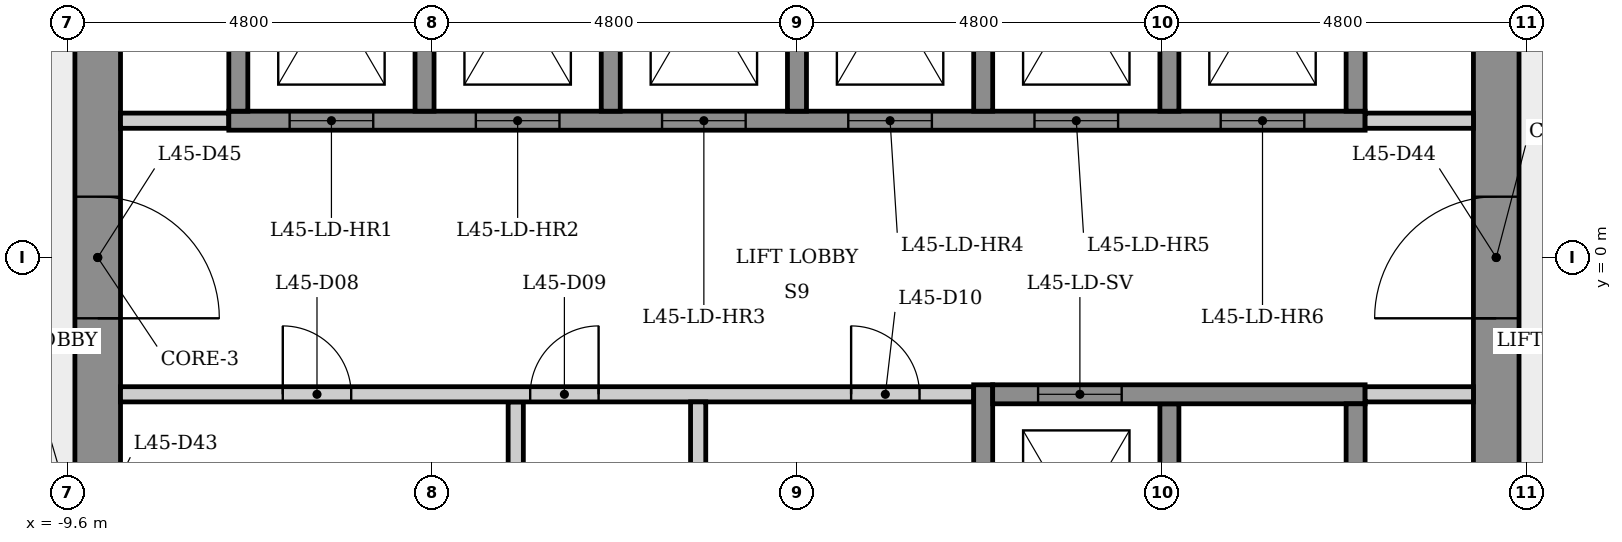
"""IFC4 building model, lengths in metres.
Left out: names, types, materials, properties, quantities, classifications, styles, units other than length and angle.
Written with IfcOpenShell. Run it as: python <this file> out.ifc"""

import sys

from ifc_helpers import new_model, si_unit, direction, frame, frame_2d, origin, place, context, subcontext, project, spatial, rectangle, extrude, element, fill, save


model = new_model("IFC4")
c1 = context("Model", 3, precision=1e-05, world=origin(), true_north=direction((0.0, 1.0)))
c2 = subcontext(c1, "Body", "Model", "MODEL_VIEW")
j1 = project(units=[si_unit("LENGTHUNIT", "METRE"), si_unit("PLANEANGLEUNIT", "RADIAN")], contexts=[c1])
p1 = place(None, origin())
s1 = spatial("IfcSite", under=j1, at=p1, CompositionType="ELEMENT")
p2 = place(p1, origin())
s2 = spatial("IfcBuilding", under=s1, at=p2, CompositionType="ELEMENT")
p3 = place(p2, frame((0.0, 0.0, 169.7)))
s3 = spatial("IfcBuildingStorey", under=s2, at=p3, CompositionType="ELEMENT", Elevation=169.7)
p4 = place(p3, frame((9.2, -5.485, 0.0), z_axis=(0.0, 0.0, 1.0), x_axis=(0.0, 1.0, 0.0)))
e1 = element("IfcWall", 1, at=p4, inside=s3, PredefinedType="SHEAR", context=c2, shape_type="SweptSolid", body=[
    extrude(rectangle(XDim=10.97, YDim=0.6, at=frame_2d((5.485, 0.0))), origin(), (0.0, 0.0, 1.0), 3.4),
])
p5 = place(p4, frame((4.685, 0.0, 0.0)))
e2 = element("IfcOpeningElement", 2, at=p5, cuts=e1, PredefinedType="OPENING", context=c2, shape_type="SweptSolid", body=[
    extrude(rectangle(XDim=1.6, YDim=2.1, at=frame_2d((0.8, 1.05))), frame((0.0, 0.31, 0.0), z_axis=(0.0, -1.0, 0.0), x_axis=(1.0, 0.0, 0.0)), (0.0, 0.0, 1.0), 0.62),
])
p6 = place(p3, frame((-9.2, 5.485, 0.0), z_axis=(0.0, 0.0, 1.0), x_axis=(0.0, -1.0, 0.0)))
e3 = element("IfcWall", 3, at=p6, inside=s3, PredefinedType="SHEAR", context=c2, shape_type="SweptSolid", body=[
    extrude(rectangle(XDim=10.97, YDim=0.6, at=frame_2d((5.485, 0.0))), origin(), (0.0, 0.0, 1.0), 3.4),
])
p7 = place(p6, frame((8.516, 0.0, 0.0)))
e4 = element("IfcOpeningElement", 4, at=p7, cuts=e3, PredefinedType="OPENING", context=c2, shape_type="SweptSolid", body=[
    extrude(rectangle(XDim=0.9, YDim=2.1, at=frame_2d((0.45, 1.05))), frame((0.0, 0.31, 0.0), z_axis=(0.0, -1.0, 0.0), x_axis=(1.0, 0.0, 0.0)), (0.0, 0.0, 1.0), 0.62),
])
p8 = place(p6, frame((4.685, 0.0, 0.0)))
e5 = element("IfcOpeningElement", 5, at=p8, cuts=e3, PredefinedType="OPENING", context=c2, shape_type="SweptSolid", body=[
    extrude(rectangle(XDim=1.6, YDim=2.1, at=frame_2d((0.8, 1.05))), frame((0.0, 0.31, 0.0), z_axis=(0.0, -1.0, 0.0), x_axis=(1.0, 0.0, 0.0)), (0.0, 0.0, 1.0), 0.62),
])
p9 = place(p3, frame((-8.9, 1.8, 0.0), z_axis=(0.0, 0.0, 1.0), x_axis=(1.0, 0.0, 0.0)))
e6 = element("IfcWall", 6, at=p9, inside=s3, PredefinedType="PARTITIONING", context=c2, shape_type="SweptSolid", body=[
    extrude(rectangle(XDim=1.425, YDim=0.2, at=frame_2d((0.712, 0.0))), origin(), (0.0, 0.0, 1.0), 3.05),
])
p10 = place(p3, frame((-7.475, 1.8, 0.0), z_axis=(0.0, 0.0, 1.0), x_axis=(1.0, 0.0, 0.0)))
e7 = element("IfcWall", 7, at=p10, inside=s3, PredefinedType="SHEAR", context=c2, shape_type="SweptSolid", body=[
    extrude(rectangle(XDim=14.95, YDim=0.25, at=frame_2d((7.475, 0.0))), origin(), (0.0, 0.0, 1.0), 3.05),
])
p11 = place(p10, frame((0.8, 0.0, 0.0)))
e8 = element("IfcOpeningElement", 8, at=p11, cuts=e7, PredefinedType="OPENING", context=c2, shape_type="SweptSolid", body=[
    extrude(rectangle(XDim=1.1, YDim=2.1, at=frame_2d((0.55, 1.05))), frame((0.0, 0.135, 0.0), z_axis=(0.0, -1.0, 0.0), x_axis=(1.0, 0.0, 0.0)), (0.0, 0.0, 1.0), 0.27),
])
p12 = place(p10, frame((3.25, 0.0, 0.0)))
e9 = element("IfcOpeningElement", 9, at=p12, cuts=e7, PredefinedType="OPENING", context=c2, shape_type="SweptSolid", body=[
    extrude(rectangle(XDim=1.1, YDim=2.1, at=frame_2d((0.55, 1.05))), frame((0.0, 0.135, 0.0), z_axis=(0.0, -1.0, 0.0), x_axis=(1.0, 0.0, 0.0)), (0.0, 0.0, 1.0), 0.27),
])
p13 = place(p10, frame((5.7, 0.0, 0.0)))
e10 = element("IfcOpeningElement", 10, at=p13, cuts=e7, PredefinedType="OPENING", context=c2, shape_type="SweptSolid", body=[
    extrude(rectangle(XDim=1.1, YDim=2.1, at=frame_2d((0.55, 1.05))), frame((0.0, 0.135, 0.0), z_axis=(0.0, -1.0, 0.0), x_axis=(1.0, 0.0, 0.0)), (0.0, 0.0, 1.0), 0.27),
])
p14 = place(p10, frame((8.15, 0.0, 0.0)))
e11 = element("IfcOpeningElement", 11, at=p14, cuts=e7, PredefinedType="OPENING", context=c2, shape_type="SweptSolid", body=[
    extrude(rectangle(XDim=1.1, YDim=2.1, at=frame_2d((0.55, 1.05))), frame((0.0, 0.135, 0.0), z_axis=(0.0, -1.0, 0.0), x_axis=(1.0, 0.0, 0.0)), (0.0, 0.0, 1.0), 0.27),
])
p15 = place(p10, frame((10.6, 0.0, 0.0)))
e12 = element("IfcOpeningElement", 12, at=p15, cuts=e7, PredefinedType="OPENING", context=c2, shape_type="SweptSolid", body=[
    extrude(rectangle(XDim=1.1, YDim=2.1, at=frame_2d((0.55, 1.05))), frame((0.0, 0.135, 0.0), z_axis=(0.0, -1.0, 0.0), x_axis=(1.0, 0.0, 0.0)), (0.0, 0.0, 1.0), 0.27),
])
p16 = place(p10, frame((13.05, 0.0, 0.0)))
e13 = element("IfcOpeningElement", 13, at=p16, cuts=e7, PredefinedType="OPENING", context=c2, shape_type="SweptSolid", body=[
    extrude(rectangle(XDim=1.1, YDim=2.1, at=frame_2d((0.55, 1.05))), frame((0.0, 0.135, 0.0), z_axis=(0.0, -1.0, 0.0), x_axis=(1.0, 0.0, 0.0)), (0.0, 0.0, 1.0), 0.27),
])
p17 = place(p3, frame((-7.35, 1.925, 0.0), z_axis=(0.0, 0.0, 1.0), x_axis=(0.0, 1.0, 0.0)))
e14 = element("IfcWall", 14, at=p17, inside=s3, PredefinedType="SHEAR", context=c2, shape_type="SweptSolid", body=[
    extrude(rectangle(XDim=4.036, YDim=0.25, at=frame_2d((2.018, 0.0))), origin(), (0.0, 0.0, 1.0), 3.05),
])
p18 = place(p3, frame((-4.9, 5.025, 0.0), z_axis=(0.0, 0.0, 1.0), x_axis=(0.0, -1.0, 0.0)))
e15 = element("IfcWall", 15, at=p18, inside=s3, PredefinedType="SHEAR", context=c2, shape_type="SweptSolid", body=[
    extrude(rectangle(XDim=3.1, YDim=0.25, at=frame_2d((1.55, 0.0))), origin(), (0.0, 0.0, 1.0), 3.4),
])
p19 = place(p3, frame((-3.7, -1.9, 0.0), z_axis=(0.0, 0.0, 1.0), x_axis=(0.0, -1.0, 0.0)))
e16 = element("IfcWall", 16, at=p19, inside=s3, PredefinedType="PARTITIONING", context=c2, shape_type="SweptSolid", body=[
    extrude(rectangle(XDim=3.15, YDim=0.2, at=frame_2d((1.575, 0.0))), origin(), (0.0, 0.0, 1.0), 3.05),
])
p20 = place(p3, frame((-8.9, -1.8, 0.0), z_axis=(0.0, 0.0, 1.0), x_axis=(1.0, 0.0, 0.0)))
e17 = element("IfcWall", 17, at=p20, inside=s3, PredefinedType="PARTITIONING", context=c2, shape_type="SweptSolid", body=[
    extrude(rectangle(XDim=11.225, YDim=0.2, at=frame_2d((5.613, 0.0))), origin(), (0.0, 0.0, 1.0), 3.05),
])
p21 = place(p20, frame((2.135, 0.0, 0.0)))
e18 = element("IfcOpeningElement", 18, at=p21, cuts=e17, PredefinedType="OPENING", context=c2, shape_type="SweptSolid", body=[
    extrude(rectangle(XDim=0.9, YDim=2.1, at=frame_2d((0.45, 1.05))), frame((0.0, 0.11, 0.0), z_axis=(0.0, -1.0, 0.0), x_axis=(1.0, 0.0, 0.0)), (0.0, 0.0, 1.0), 0.22),
])
p22 = place(p20, frame((5.39, 0.0, 0.0)))
e19 = element("IfcOpeningElement", 19, at=p22, cuts=e17, PredefinedType="OPENING", context=c2, shape_type="SweptSolid", body=[
    extrude(rectangle(XDim=0.9, YDim=2.1, at=frame_2d((0.45, 1.05))), frame((0.0, 0.11, 0.0), z_axis=(0.0, -1.0, 0.0), x_axis=(1.0, 0.0, 0.0)), (0.0, 0.0, 1.0), 0.22),
])
p23 = place(p20, frame((9.613, 0.0, 0.0)))
e20 = element("IfcOpeningElement", 20, at=p23, cuts=e17, PredefinedType="OPENING", context=c2, shape_type="SweptSolid", body=[
    extrude(rectangle(XDim=0.9, YDim=2.1, at=frame_2d((0.45, 1.05))), frame((0.0, 0.11, 0.0), z_axis=(0.0, -1.0, 0.0), x_axis=(1.0, 0.0, 0.0)), (0.0, 0.0, 1.0), 0.22),
])
p24 = place(p3, frame((-2.45, 5.025, 0.0), z_axis=(0.0, 0.0, 1.0), x_axis=(0.0, -1.0, 0.0)))
e21 = element("IfcWall", 21, at=p24, inside=s3, PredefinedType="SHEAR", context=c2, shape_type="SweptSolid", body=[
    extrude(rectangle(XDim=3.1, YDim=0.25, at=frame_2d((1.55, 0.0))), origin(), (0.0, 0.0, 1.0), 3.4),
])
p25 = place(p3, frame((-1.3, -1.9, 0.0), z_axis=(0.0, 0.0, 1.0), x_axis=(0.0, -1.0, 0.0)))
e22 = element("IfcWall", 22, at=p25, inside=s3, PredefinedType="PARTITIONING", context=c2, shape_type="SweptSolid", body=[
    extrude(rectangle(XDim=3.15, YDim=0.2, at=frame_2d((1.575, 0.0))), origin(), (0.0, 0.0, 1.0), 3.05),
])
p26 = place(p3, frame((0.0, 5.025, 0.0), z_axis=(0.0, 0.0, 1.0), x_axis=(0.0, -1.0, 0.0)))
e23 = element("IfcWall", 23, at=p26, inside=s3, PredefinedType="SHEAR", context=c2, shape_type="SweptSolid", body=[
    extrude(rectangle(XDim=3.1, YDim=0.25, at=frame_2d((1.55, 0.0))), origin(), (0.0, 0.0, 1.0), 3.4),
])
p27 = place(p3, frame((2.45, -5.275, 0.0), z_axis=(0.0, 0.0, 1.0), x_axis=(0.0, 1.0, 0.0)))
e24 = element("IfcWall", 24, at=p27, inside=s3, PredefinedType="SHEAR", context=c2, shape_type="SweptSolid", body=[
    extrude(rectangle(XDim=3.6, YDim=0.25, at=frame_2d((1.8, 0.0))), origin(), (0.0, 0.0, 1.0), 3.05),
])
for number, where, z_axis, x_axis in (
    (25, (2.45, 5.025, 0.0), (0.0, 0.0, 1.0), (0.0, -1.0, 0.0)),
    (26, (4.9, -1.925, 0.0), (0.0, 0.0, 1.0), (0.0, -1.0, 0.0)),
    (27, (4.9, 5.025, 0.0), (0.0, 0.0, 1.0), (0.0, -1.0, 0.0)),
):
    element("IfcWall", number, at=place(p3, frame(where, z_axis=z_axis, x_axis=x_axis)), inside=s3, PredefinedType="SHEAR", context=c2, shape_type="SweptSolid", body=[
        extrude(rectangle(XDim=3.1, YDim=0.25, at=frame_2d((1.55, 0.0))), origin(), (0.0, 0.0, 1.0), 3.4),
    ])
p28 = place(p3, frame((2.575, -1.8, 0.0), z_axis=(0.0, 0.0, 1.0), x_axis=(1.0, 0.0, 0.0)))
e28 = element("IfcWall", 28, at=p28, inside=s3, PredefinedType="SHEAR", context=c2, shape_type="SweptSolid", body=[
    extrude(rectangle(XDim=4.9, YDim=0.25, at=frame_2d((2.45, 0.0))), origin(), (0.0, 0.0, 1.0), 3.05),
])
p29 = place(p28, frame((0.597, 0.0, 0.0)))
e29 = element("IfcOpeningElement", 29, at=p29, cuts=e28, PredefinedType="OPENING", context=c2, shape_type="SweptSolid", body=[
    extrude(rectangle(XDim=1.1, YDim=2.1, at=frame_2d((0.55, 1.05))), frame((0.0, 0.135, 0.0), z_axis=(0.0, -1.0, 0.0), x_axis=(1.0, 0.0, 0.0)), (0.0, 0.0, 1.0), 0.27),
])
p30 = place(p3, frame((7.475, 1.8, 0.0), z_axis=(0.0, 0.0, 1.0), x_axis=(1.0, 0.0, 0.0)))
e30 = element("IfcWall", 30, at=p30, inside=s3, PredefinedType="PARTITIONING", context=c2, shape_type="SweptSolid", body=[
    extrude(rectangle(XDim=1.425, YDim=0.2, at=frame_2d((0.712, 0.0))), origin(), (0.0, 0.0, 1.0), 3.05),
])
for number, where, z_axis, x_axis in (
    (31, (7.35, -1.925, 0.0), (0.0, 0.0, 1.0), (0.0, -1.0, 0.0)),
    (32, (7.35, 5.025, 0.0), (0.0, 0.0, 1.0), (0.0, -1.0, 0.0)),
):
    element("IfcWall", number, at=place(p3, frame(where, z_axis=z_axis, x_axis=x_axis)), inside=s3, PredefinedType="SHEAR", context=c2, shape_type="SweptSolid", body=[
        extrude(rectangle(XDim=3.1, YDim=0.25, at=frame_2d((1.55, 0.0))), origin(), (0.0, 0.0, 1.0), 3.4),
    ])
p31 = place(p3, frame((8.9, -1.8, 0.0), z_axis=(0.0, 0.0, 1.0), x_axis=(-1.0, 0.0, 0.0)))
e33 = element("IfcWall", 33, at=p31, inside=s3, PredefinedType="PARTITIONING", context=c2, shape_type="SweptSolid", body=[
    extrude(rectangle(XDim=1.425, YDim=0.2, at=frame_2d((0.712, 0.0))), origin(), (0.0, 0.0, 1.0), 3.05),
])
p32 = place(p11, origin())
e34 = element("IfcDoor", 34, at=p32, inside=s3, OperationType="SLIDING_TO_LEFT", PredefinedType="DOOR", context=c2, shape_type="SweptSolid", body=[
    extrude(rectangle(XDim=1.1, YDim=2.1, at=frame_2d((0.55, 1.05))), frame((0.0, 0.025, 0.0), z_axis=(0.0, -1.0, 0.0), x_axis=(1.0, 0.0, 0.0)), (0.0, 0.0, 1.0), 0.05),
])
fill(e8, e34)
p33 = place(p12, origin())
e35 = element("IfcDoor", 35, at=p33, inside=s3, OperationType="SLIDING_TO_LEFT", PredefinedType="DOOR", context=c2, shape_type="SweptSolid", body=[
    extrude(rectangle(XDim=1.1, YDim=2.1, at=frame_2d((0.55, 1.05))), frame((0.0, 0.025, 0.0), z_axis=(0.0, -1.0, 0.0), x_axis=(1.0, 0.0, 0.0)), (0.0, 0.0, 1.0), 0.05),
])
fill(e9, e35)
p34 = place(p13, origin())
e36 = element("IfcDoor", 36, at=p34, inside=s3, OperationType="SLIDING_TO_LEFT", PredefinedType="DOOR", context=c2, shape_type="SweptSolid", body=[
    extrude(rectangle(XDim=1.1, YDim=2.1, at=frame_2d((0.55, 1.05))), frame((0.0, 0.025, 0.0), z_axis=(0.0, -1.0, 0.0), x_axis=(1.0, 0.0, 0.0)), (0.0, 0.0, 1.0), 0.05),
])
fill(e10, e36)
p35 = place(p14, origin())
e37 = element("IfcDoor", 37, at=p35, inside=s3, OperationType="SLIDING_TO_LEFT", PredefinedType="DOOR", context=c2, shape_type="SweptSolid", body=[
    extrude(rectangle(XDim=1.1, YDim=2.1, at=frame_2d((0.55, 1.05))), frame((0.0, 0.025, 0.0), z_axis=(0.0, -1.0, 0.0), x_axis=(1.0, 0.0, 0.0)), (0.0, 0.0, 1.0), 0.05),
])
fill(e11, e37)
p36 = place(p15, origin())
e38 = element("IfcDoor", 38, at=p36, inside=s3, OperationType="SLIDING_TO_LEFT", PredefinedType="DOOR", context=c2, shape_type="SweptSolid", body=[
    extrude(rectangle(XDim=1.1, YDim=2.1, at=frame_2d((0.55, 1.05))), frame((0.0, 0.025, 0.0), z_axis=(0.0, -1.0, 0.0), x_axis=(1.0, 0.0, 0.0)), (0.0, 0.0, 1.0), 0.05),
])
fill(e12, e38)
p37 = place(p16, origin())
e39 = element("IfcDoor", 39, at=p37, inside=s3, OperationType="SLIDING_TO_LEFT", PredefinedType="DOOR", context=c2, shape_type="SweptSolid", body=[
    extrude(rectangle(XDim=1.1, YDim=2.1, at=frame_2d((0.55, 1.05))), frame((0.0, 0.025, 0.0), z_axis=(0.0, -1.0, 0.0), x_axis=(1.0, 0.0, 0.0)), (0.0, 0.0, 1.0), 0.05),
])
fill(e13, e39)
p38 = place(p29, origin())
e40 = element("IfcDoor", 40, at=p38, inside=s3, OperationType="SLIDING_TO_LEFT", PredefinedType="DOOR", context=c2, shape_type="SweptSolid", body=[
    extrude(rectangle(XDim=1.1, YDim=2.1, at=frame_2d((0.55, 1.05))), frame((0.0, 0.025, 0.0), z_axis=(0.0, -1.0, 0.0), x_axis=(1.0, 0.0, 0.0)), (0.0, 0.0, 1.0), 0.05),
])
fill(e29, e40)
p39 = place(p21, origin())
e41 = element("IfcDoor", 41, at=p39, inside=s3, OperationType="SINGLE_SWING_LEFT", PredefinedType="DOOR", context=c2, shape_type="SweptSolid", body=[
    extrude(rectangle(XDim=0.9, YDim=2.1, at=frame_2d((0.45, 1.05))), frame((0.0, 0.025, 0.0), z_axis=(0.0, -1.0, 0.0), x_axis=(1.0, 0.0, 0.0)), (0.0, 0.0, 1.0), 0.05),
])
fill(e18, e41)
p40 = place(p22, origin())
e42 = element("IfcDoor", 42, at=p40, inside=s3, OperationType="SINGLE_SWING_RIGHT", PredefinedType="DOOR", context=c2, shape_type="SweptSolid", body=[
    extrude(rectangle(XDim=0.9, YDim=2.1, at=frame_2d((0.45, 1.05))), frame((0.0, 0.025, 0.0), z_axis=(0.0, -1.0, 0.0), x_axis=(1.0, 0.0, 0.0)), (0.0, 0.0, 1.0), 0.05),
])
fill(e19, e42)
p41 = place(p23, origin())
e43 = element("IfcDoor", 43, at=p41, inside=s3, OperationType="SINGLE_SWING_LEFT", PredefinedType="DOOR", context=c2, shape_type="SweptSolid", body=[
    extrude(rectangle(XDim=0.9, YDim=2.1, at=frame_2d((0.45, 1.05))), frame((0.0, 0.025, 0.0), z_axis=(0.0, -1.0, 0.0), x_axis=(1.0, 0.0, 0.0)), (0.0, 0.0, 1.0), 0.05),
])
fill(e20, e43)
p42 = place(p5, origin())
e44 = element("IfcDoor", 44, at=p42, inside=s3, OperationType="SINGLE_SWING_LEFT", PredefinedType="DOOR", context=c2, shape_type="SweptSolid", body=[
    extrude(rectangle(XDim=1.6, YDim=2.1, at=frame_2d((0.8, 1.05))), frame((0.0, 0.025, 0.0), z_axis=(0.0, -1.0, 0.0), x_axis=(1.0, 0.0, 0.0)), (0.0, 0.0, 1.0), 0.05),
])
fill(e2, e44)
p43 = place(p8, origin())
e45 = element("IfcDoor", 45, at=p43, inside=s3, OperationType="SINGLE_SWING_RIGHT", PredefinedType="DOOR", context=c2, shape_type="SweptSolid", body=[
    extrude(rectangle(XDim=1.6, YDim=2.1, at=frame_2d((0.8, 1.05))), frame((0.0, 0.025, 0.0), z_axis=(0.0, -1.0, 0.0), x_axis=(1.0, 0.0, 0.0)), (0.0, 0.0, 1.0), 0.05),
])
fill(e5, e45)
save(model, sys.argv[1])
